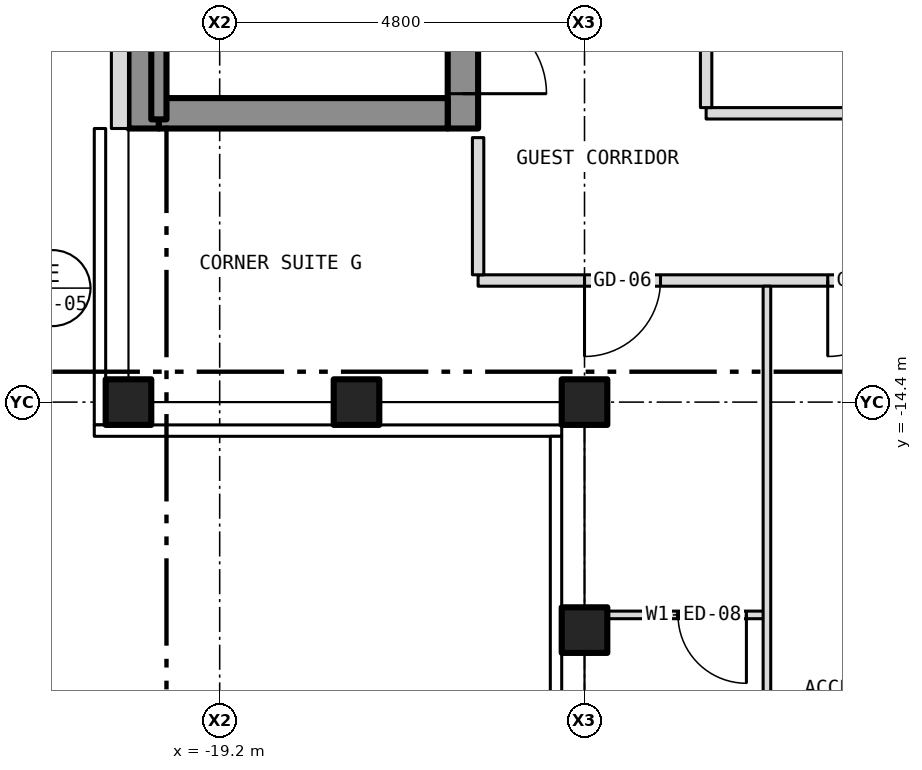
"""IFC4 building model, lengths in metres.
Left out: names, types, materials, properties, quantities, classifications, styles, units other than length and angle.
Written with IfcOpenShell. Run it as: python <this file> out.ifc"""

import sys

from ifc_helpers import new_model, si_unit, direction, frame, frame_2d, origin, origin_2d, place, context, subcontext, project, spatial, rectangle, hollow_rectangle, extrude, element, fill, save


model = new_model("IFC4")
c1 = context("Model", 3, precision=1e-05, world=origin(), true_north=direction((0.0, 1.0)))
c2 = subcontext(c1, "Body", "Model", "MODEL_VIEW")
j1 = project(units=[si_unit("LENGTHUNIT", "METRE"), si_unit("PLANEANGLEUNIT", "RADIAN")], contexts=[c1])
p1 = place(None, origin())
s1 = spatial("IfcSite", under=j1, at=p1, CompositionType="ELEMENT")
p2 = place(p1, origin())
s2 = spatial("IfcBuilding", under=s1, at=p2, CompositionType="ELEMENT")
p3 = place(p2, frame((0.0, 0.0, 248.0)))
s3 = spatial("IfcBuildingStorey", under=s2, at=p3, CompositionType="ELEMENT", Elevation=248.0)
for number, where, z_axis, x_axis in (
    (1, (-20.4, -14.4, -0.15), (0.0, 0.0, 1.0), (1.0, 0.0, 0.0)),
    (2, (-14.4, -14.4, -0.15), (0.0, 0.0, 1.0), (1.0, 0.0, 0.0)),
    (3, (-14.4, -17.4, -0.15), (0.0, 0.0, 1.0), (1.0, 0.0, 0.0)),
    (4, (-17.4, -14.4, -0.15), (0.0, 0.0, 1.0), (1.0, 0.0, 0.0)),
):
    element("IfcColumn", number, at=place(p3, frame(where, z_axis=z_axis, x_axis=x_axis)), inside=s3, PredefinedType="COLUMN", context=c2, shape_type="SweptSolid", body=[
        extrude(hollow_rectangle(XDim=0.6, YDim=0.6, WallThickness=0.03, at=origin_2d()), origin(), (0.0, 0.0, 1.0), 3.5),
    ])
p4 = place(p3, frame((-16.0, -10.8, 0.0), z_axis=(0.0, 0.0, 1.0), x_axis=(0.0, 1.0, 0.0)))
e5 = element("IfcWall", 5, at=p4, inside=s3, PredefinedType="SHEAR", context=c2, shape_type="SweptSolid", body=[
    extrude(rectangle(XDim=21.6, YDim=0.4, at=frame_2d((10.8, 0.0))), origin(), (0.0, 0.0, 1.0), 3.25),
])
p5 = place(p4, frame((9.4, 0.0, 0.0)))
e6 = element("IfcOpeningElement", 6, at=p5, cuts=e5, PredefinedType="OPENING", context=c2, shape_type="SweptSolid", body=[
    extrude(rectangle(XDim=1.1, YDim=2.1, at=frame_2d((0.55, 1.05))), frame((0.0, 0.212, 0.0), z_axis=(0.0, -1.0, 0.0), x_axis=(1.0, 0.0, 0.0)), (0.0, 0.0, 1.0), 0.424),
])
p6 = place(p4, frame((11.5, 0.0, 0.0)))
e7 = element("IfcOpeningElement", 7, at=p6, cuts=e5, PredefinedType="OPENING", context=c2, shape_type="SweptSolid", body=[
    extrude(rectangle(XDim=1.1, YDim=2.1, at=frame_2d((0.55, 1.05))), frame((0.0, 0.212, 0.0), z_axis=(0.0, -1.0, 0.0), x_axis=(1.0, 0.0, 0.0)), (0.0, 0.0, 1.0), 0.424),
])
p7 = place(p4, frame((13.6, 0.0, 0.0)))
e8 = element("IfcOpeningElement", 8, at=p7, cuts=e5, PredefinedType="OPENING", context=c2, shape_type="SweptSolid", body=[
    extrude(rectangle(XDim=1.1, YDim=2.1, at=frame_2d((0.55, 1.05))), frame((0.0, 0.212, 0.0), z_axis=(0.0, -1.0, 0.0), x_axis=(1.0, 0.0, 0.0)), (0.0, 0.0, 1.0), 0.424),
])
p8 = place(p4, frame((15.7, 0.0, 0.0)))
e9 = element("IfcOpeningElement", 9, at=p8, cuts=e5, PredefinedType="OPENING", context=c2, shape_type="SweptSolid", body=[
    extrude(rectangle(XDim=1.1, YDim=2.1, at=frame_2d((0.55, 1.05))), frame((0.0, 0.212, 0.0), z_axis=(0.0, -1.0, 0.0), x_axis=(1.0, 0.0, 0.0)), (0.0, 0.0, 1.0), 0.424),
])
p9 = place(p4, frame((17.8, 0.0, 0.0)))
e10 = element("IfcOpeningElement", 10, at=p9, cuts=e5, PredefinedType="OPENING", context=c2, shape_type="SweptSolid", body=[
    extrude(rectangle(XDim=1.1, YDim=2.1, at=frame_2d((0.55, 1.05))), frame((0.0, 0.212, 0.0), z_axis=(0.0, -1.0, 0.0), x_axis=(1.0, 0.0, 0.0)), (0.0, 0.0, 1.0), 0.424),
])
p10 = place(p4, frame((0.458, 0.0, 0.0)))
e11 = element("IfcOpeningElement", 11, at=p10, cuts=e5, PredefinedType="OPENING", context=c2, shape_type="SweptSolid", body=[
    extrude(rectangle(XDim=1.1, YDim=2.1, at=frame_2d((0.55, 1.05))), frame((0.0, 0.212, 0.0), z_axis=(0.0, -1.0, 0.0), x_axis=(1.0, 0.0, 0.0)), (0.0, 0.0, 1.0), 0.424),
])
p11 = place(p4, frame((7.5, 0.0, 0.0)))
e12 = element("IfcOpeningElement", 12, at=p11, cuts=e5, PredefinedType="OPENING", context=c2, shape_type="SweptSolid", body=[
    extrude(rectangle(XDim=1.1, YDim=2.1, at=frame_2d((0.55, 1.05))), frame((0.0, 0.212, 0.0), z_axis=(0.0, -1.0, 0.0), x_axis=(1.0, 0.0, 0.0)), (0.0, 0.0, 1.0), 0.424),
])
p12 = place(p4, frame((20.0, 0.0, 0.0)))
e13 = element("IfcOpeningElement", 13, at=p12, cuts=e5, PredefinedType="OPENING", context=c2, shape_type="SweptSolid", body=[
    extrude(rectangle(XDim=0.9, YDim=2.1, at=frame_2d((0.45, 1.05))), frame((0.0, 0.212, 0.0), z_axis=(0.0, -1.0, 0.0), x_axis=(1.0, 0.0, 0.0)), (0.0, 0.0, 1.0), 0.424),
])
p13 = place(p3, frame((-20.2, -10.8, 0.0), z_axis=(0.0, 0.0, 1.0), x_axis=(0.0, 1.0, 0.0)))
e14 = element("IfcWall", 14, at=p13, inside=s3, PredefinedType="SHEAR", context=c2, shape_type="SweptSolid", body=[
    extrude(rectangle(XDim=21.6, YDim=0.4, at=frame_2d((10.8, 0.0))), origin(), (0.0, 0.0, 1.0), 3.25),
])
p14 = place(p3, frame((-20.0, -10.6, 0.0), z_axis=(0.0, 0.0, 1.0), x_axis=(1.0, 0.0, 0.0)))
e15 = element("IfcWall", 15, at=p14, inside=s3, PredefinedType="SHEAR", context=c2, shape_type="SweptSolid", body=[
    extrude(rectangle(XDim=3.8, YDim=0.4, at=frame_2d((1.9, 0.0))), origin(), (0.0, 0.0, 1.0), 3.25),
])
p15 = place(p3, frame((-20.512, 10.8, 0.0), z_axis=(0.0, 0.0, 1.0), x_axis=(0.0, -1.0, 0.0)))
e16 = element("IfcWall", 16, at=p15, inside=s3, PredefinedType="SOLIDWALL", context=c2, shape_type="SweptSolid", body=[
    extrude(rectangle(XDim=21.6, YDim=0.225, at=frame_2d((10.8, 0.0))), origin(), (0.0, 0.0, 1.0), 3.5),
])
p16 = place(p15, frame((18.05, 0.0, 1.0)))
e17 = element("IfcOpeningElement", 17, at=p16, cuts=e16, PredefinedType="OPENING", context=c2, shape_type="SweptSolid", body=[
    extrude(rectangle(XDim=0.6, YDim=1.5, at=frame_2d((0.3, 0.75))), frame((0.0, 0.125, 0.0), z_axis=(0.0, -1.0, 0.0), x_axis=(1.0, 0.0, 0.0)), (0.0, 0.0, 1.0), 0.249),
])
p17 = place(p3, frame((-14.28, -17.2, 0.0), z_axis=(0.0, 0.0, 1.0), x_axis=(1.0, 0.0, 0.0)))
e18 = element("IfcWall", 18, at=p17, inside=s3, PredefinedType="PARTITIONING", context=c2, shape_type="SweptSolid", body=[
    extrude(rectangle(XDim=2.28, YDim=0.1, at=frame_2d((1.14, 0.0))), origin(), (0.0, 0.0, 1.0), 3.35),
])
p18 = place(p17, frame((1.11, 0.0, 0.0)))
e19 = element("IfcOpeningElement", 19, at=p18, cuts=e18, PredefinedType="OPENING", context=c2, shape_type="SweptSolid", body=[
    extrude(rectangle(XDim=0.9, YDim=2.1, at=frame_2d((0.45, 1.05))), frame((0.0, 0.062, 0.0), z_axis=(0.0, -1.0, 0.0), x_axis=(1.0, 0.0, 0.0)), (0.0, 0.0, 1.0), 0.124),
])
p19 = place(p3, frame((-15.8, -12.8, 0.0), z_axis=(0.0, 0.0, 1.0), x_axis=(1.0, 0.0, 0.0)))
e20 = element("IfcWall", 20, at=p19, inside=s3, PredefinedType="PARTITIONING", context=c2, shape_type="SweptSolid", body=[
    extrude(rectangle(XDim=31.6, YDim=0.15, at=frame_2d((15.8, 0.0))), origin(), (0.0, 0.0, 1.0), 3.35),
])
p20 = place(p19, frame((4.6, 0.0, 0.0)))
e21 = element("IfcOpeningElement", 21, at=p20, cuts=e20, PredefinedType="OPENING", context=c2, shape_type="SweptSolid", body=[
    extrude(rectangle(XDim=1.0, YDim=2.1, at=frame_2d((0.5, 1.05))), frame((0.0, 0.087, 0.0), z_axis=(0.0, -1.0, 0.0), x_axis=(1.0, 0.0, 0.0)), (0.0, 0.0, 1.0), 0.174),
])
p21 = place(p19, frame((12.8, 0.0, 0.0)))
e22 = element("IfcOpeningElement", 22, at=p21, cuts=e20, PredefinedType="OPENING", context=c2, shape_type="SweptSolid", body=[
    extrude(rectangle(XDim=1.0, YDim=2.1, at=frame_2d((0.5, 1.05))), frame((0.0, 0.087, 0.0), z_axis=(0.0, -1.0, 0.0), x_axis=(1.0, 0.0, 0.0)), (0.0, 0.0, 1.0), 0.174),
])
p22 = place(p19, frame((18.0, 0.0, 0.0)))
e23 = element("IfcOpeningElement", 23, at=p22, cuts=e20, PredefinedType="OPENING", context=c2, shape_type="SweptSolid", body=[
    extrude(rectangle(XDim=1.0, YDim=2.1, at=frame_2d((0.5, 1.05))), frame((0.0, 0.087, 0.0), z_axis=(0.0, -1.0, 0.0), x_axis=(1.0, 0.0, 0.0)), (0.0, 0.0, 1.0), 0.174),
])
p23 = place(p19, frame((1.4, 0.0, 0.0)))
e24 = element("IfcOpeningElement", 24, at=p23, cuts=e20, PredefinedType="OPENING", context=c2, shape_type="SweptSolid", body=[
    extrude(rectangle(XDim=1.0, YDim=2.1, at=frame_2d((0.5, 1.05))), frame((0.0, 0.087, 0.0), z_axis=(0.0, -1.0, 0.0), x_axis=(1.0, 0.0, 0.0)), (0.0, 0.0, 1.0), 0.174),
])
p24 = place(p19, frame((29.2, 0.0, 0.0)))
e25 = element("IfcOpeningElement", 25, at=p24, cuts=e20, PredefinedType="OPENING", context=c2, shape_type="SweptSolid", body=[
    extrude(rectangle(XDim=1.0, YDim=2.1, at=frame_2d((0.5, 1.05))), frame((0.0, 0.087, 0.0), z_axis=(0.0, -1.0, 0.0), x_axis=(1.0, 0.0, 0.0)), (0.0, 0.0, 1.0), 0.174),
])
p25 = place(p3, frame((-12.8, -10.6, 0.0), z_axis=(0.0, 0.0, 1.0), x_axis=(1.0, 0.0, 0.0)))
e26 = element("IfcWall", 26, at=p25, inside=s3, PredefinedType="PARTITIONING", context=c2, shape_type="SweptSolid", body=[
    extrude(rectangle(XDim=20.3, YDim=0.15, at=frame_2d((10.15, 0.0))), origin(), (0.0, 0.0, 1.0), 3.35),
])
p26 = place(p25, frame((11.3, 0.0, 0.0)))
e27 = element("IfcOpeningElement", 27, at=p26, cuts=e26, PredefinedType="OPENING", context=c2, shape_type="SweptSolid", body=[
    extrude(rectangle(XDim=0.9, YDim=2.1, at=frame_2d((0.45, 1.05))), frame((0.0, 0.087, 0.0), z_axis=(0.0, -1.0, 0.0), x_axis=(1.0, 0.0, 0.0)), (0.0, 0.0, 1.0), 0.174),
])
p27 = place(p3, frame((-20.0, -10.68, 0.0), z_axis=(0.0, 0.0, 1.0), x_axis=(0.0, 1.0, 0.0)))
e28 = element("IfcWall", 28, at=p27, inside=s3, PredefinedType="SHEAR", context=c2, shape_type="SweptSolid", body=[
    extrude(rectangle(XDim=6.98, YDim=0.2, at=frame_2d((3.49, 0.0))), origin(), (0.0, 0.0, 1.0), 3.25),
])
p28 = place(p3, frame((-15.8, -12.725, 0.0), z_axis=(0.0, 0.0, 1.0), x_axis=(0.0, 1.0, 0.0)))
e29 = element("IfcWall", 29, at=p28, inside=s3, PredefinedType="PARTITIONING", context=c2, shape_type="SweptSolid", body=[
    extrude(rectangle(XDim=1.805, YDim=0.15, at=frame_2d((0.903, 0.0))), origin(), (0.0, 0.0, 1.0), 3.35),
])
p29 = place(p3, frame((-12.8, -10.525, 0.0), z_axis=(0.0, 0.0, 1.0), x_axis=(0.0, 1.0, 0.0)))
e30 = element("IfcWall", 30, at=p29, inside=s3, PredefinedType="PARTITIONING", context=c2, shape_type="SweptSolid", body=[
    extrude(rectangle(XDim=8.525, YDim=0.15, at=frame_2d((4.262, 0.0))), origin(), (0.0, 0.0, 1.0), 3.35),
])
p30 = place(p29, frame((3.825, 0.0, 0.0)))
e31 = element("IfcOpeningElement", 31, at=p30, cuts=e30, PredefinedType="OPENING", context=c2, shape_type="SweptSolid", body=[
    extrude(rectangle(XDim=0.9, YDim=2.1, at=frame_2d((0.45, 1.05))), frame((0.0, 0.087, 0.0), z_axis=(0.0, -1.0, 0.0), x_axis=(1.0, 0.0, 0.0)), (0.0, 0.0, 1.0), 0.174),
])
p31 = place(p3, frame((-12.0, -20.73, 0.0), z_axis=(0.0, 0.0, 1.0), x_axis=(0.0, 1.0, 0.0)))
e32 = element("IfcWall", 32, at=p31, inside=s3, PredefinedType="PARTITIONING", context=c2, shape_type="SweptSolid", body=[
    extrude(rectangle(XDim=7.855, YDim=0.1, at=frame_2d((3.927, 0.0))), origin(), (0.0, 0.0, 1.0), 3.35),
])
p32 = place(p10, origin())
e33 = element("IfcDoor", 33, at=p32, inside=s3, OperationType="SINGLE_SWING_LEFT", PredefinedType="DOOR", context=c2, shape_type="SweptSolid", body=[
    extrude(rectangle(XDim=1.1, YDim=2.1, at=frame_2d((0.55, 1.05))), frame((0.0, 0.025, 0.0), z_axis=(0.0, -1.0, 0.0), x_axis=(1.0, 0.0, 0.0)), (0.0, 0.0, 1.0), 0.05),
])
fill(e11, e33)
p33 = place(p20, origin())
e34 = element("IfcDoor", 34, at=p33, inside=s3, OperationType="SINGLE_SWING_LEFT", PredefinedType="DOOR", context=c2, shape_type="SweptSolid", body=[
    extrude(rectangle(XDim=1.0, YDim=2.1, at=frame_2d((0.5, 1.05))), frame((0.0, 0.025, 0.0), z_axis=(0.0, -1.0, 0.0), x_axis=(1.0, 0.0, 0.0)), (0.0, 0.0, 1.0), 0.05),
])
fill(e21, e34)
p34 = place(p18, origin())
e35 = element("IfcDoor", 35, at=p34, inside=s3, OperationType="SINGLE_SWING_RIGHT", PredefinedType="DOOR", context=c2, shape_type="SweptSolid", body=[
    extrude(rectangle(XDim=0.9, YDim=2.1, at=frame_2d((0.45, 1.05))), frame((0.0, 0.025, 0.0), z_axis=(0.0, -1.0, 0.0), x_axis=(1.0, 0.0, 0.0)), (0.0, 0.0, 1.0), 0.05),
])
fill(e19, e35)
p35 = place(p23, origin())
e36 = element("IfcDoor", 36, at=p35, inside=s3, OperationType="SINGLE_SWING_LEFT", PredefinedType="DOOR", context=c2, shape_type="SweptSolid", body=[
    extrude(rectangle(XDim=1.0, YDim=2.1, at=frame_2d((0.5, 1.05))), frame((0.0, 0.025, 0.0), z_axis=(0.0, -1.0, 0.0), x_axis=(1.0, 0.0, 0.0)), (0.0, 0.0, 1.0), 0.05),
])
fill(e24, e36)
save(model, sys.argv[1])
